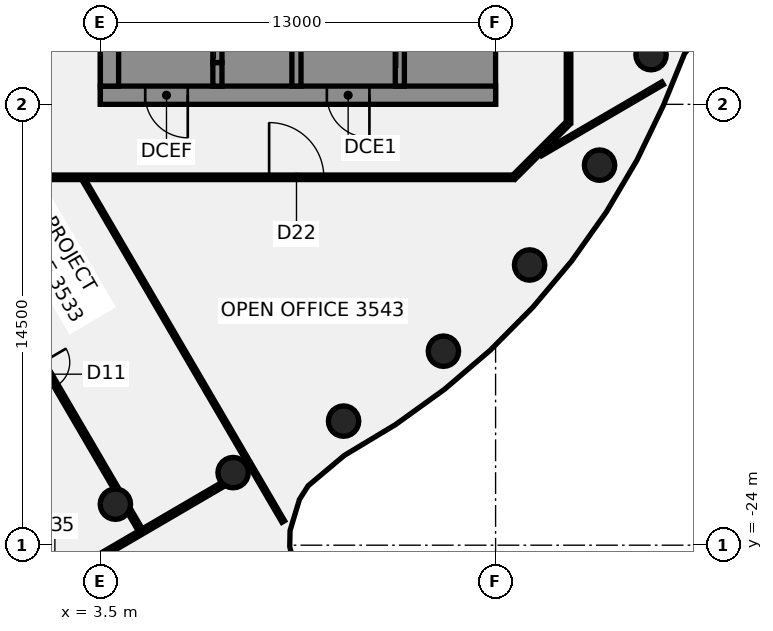
"""IFC4 building model, lengths in metres.
Left out: names, types, materials, properties, quantities, classifications, styles, units other than length and angle.
Written with IfcOpenShell. Run it as: python <this file> out.ifc"""

import sys

from ifc_helpers import new_model, si_unit, direction, frame, frame_2d, origin, origin_2d, place, context, subcontext, project, spatial, polyline, rectangle, circle, outline, extrude, element, fill, save


model = new_model("IFC4")
c1 = context("Model", 3, precision=1e-05, world=origin(), true_north=direction((0.0, 1.0)))
c2 = subcontext(c1, "Body", "Model", "MODEL_VIEW")
j1 = project(units=[si_unit("LENGTHUNIT", "METRE"), si_unit("PLANEANGLEUNIT", "RADIAN")], contexts=[c1])
p1 = place(None, origin())
s1 = spatial("IfcSite", under=j1, at=p1, CompositionType="ELEMENT")
p2 = place(p1, origin())
s2 = spatial("IfcBuilding", under=s1, at=p2, CompositionType="ELEMENT")
p3 = place(p2, frame((0.0, 0.0, 144.25)))
s3 = spatial("IfcBuildingStorey", under=s2, at=p3, CompositionType="ELEMENT", Elevation=144.25)
for number, where, z_axis, x_axis in (
    (1, (3.994, -22.651, -0.14), (0.0, 0.0, 1.0), (1.0, 0.0, 0.0)),
    (2, (7.866, -21.613, -0.14), (0.0, 0.0, 1.0), (1.0, 0.0, 0.0)),
    (3, (11.5, -19.919, -0.14), (0.0, 0.0, 1.0), (1.0, 0.0, 0.0)),
    (4, (14.784, -17.619, -0.14), (0.0, 0.0, 1.0), (1.0, 0.0, 0.0)),
    (5, (17.619, -14.784, -0.14), (0.0, 0.0, 1.0), (1.0, 0.0, 0.0)),
    (6, (19.919, -11.5, -0.14), (0.0, 0.0, 1.0), (1.0, 0.0, 0.0)),
    (7, (21.613, -7.866, -0.14), (0.0, 0.0, 1.0), (1.0, 0.0, 0.0)),
):
    element("IfcColumn", number, at=place(p3, frame(where, z_axis=z_axis, x_axis=x_axis)), inside=s3, PredefinedType="COLUMN", context=c2, shape_type="SweptSolid", body=[
        extrude(circle(Radius=0.5, at=origin_2d()), origin(), (0.0, 0.0, 1.0), 3.75),
    ])
p4 = place(p3, frame((-1.908, -11.995, 0.0), z_axis=(0.0, 0.0, 1.0), x_axis=(0.504524006629, -0.863397664309, 0.0)))
e8 = element("IfcWall", 8, at=p4, inside=s3, PredefinedType="PARTITIONING", context=c2, shape_type="SweptSolid", body=[
    extrude(rectangle(XDim=11.76, YDim=0.15, at=frame_2d((5.88, 0.0))), origin(), (0.0, 0.0, 1.0), 3.01),
])
p5 = place(p4, frame((6.94, 0.0, 0.0)))
e9 = element("IfcOpeningElement", 9, at=p5, cuts=e8, PredefinedType="OPENING", context=c2, shape_type="SweptSolid", body=[
    extrude(rectangle(XDim=0.9, YDim=2.1, at=frame_2d((0.45, 1.05))), frame((0.0, 0.085, 0.0), z_axis=(0.0, -1.0, 0.0), x_axis=(1.0, 0.0, 0.0)), (0.0, 0.0, 1.0), 0.17),
])
p6 = place(p3, frame((4.446, -22.869, 0.0), z_axis=(0.0, 0.0, 1.0), x_axis=(0.504392576963, -0.863474451448, 0.0)))
e10 = element("IfcWall", 10, at=p6, inside=s3, PredefinedType="PARTITIONING", context=c2, shape_type="SweptSolid", body=[
    extrude(rectangle(XDim=0.728, YDim=0.15, at=frame_2d((0.364, 0.0))), origin(), (0.0, 0.0, 1.0), 3.01),
])
p7 = place(p3, frame((2.949, -11.982, 0.0), z_axis=(0.0, 0.0, 1.0), x_axis=(0.504470329386, -0.863429028218, 0.0)))
e11 = element("IfcWall", 11, at=p7, inside=s3, PredefinedType="PARTITIONING", context=c2, shape_type="SweptSolid", body=[
    extrude(rectangle(XDim=13.016, YDim=0.1, at=frame_2d((6.508, 0.0))), origin(), (0.0, 0.0, 1.0), 3.01),
])
p8 = place(p3, frame((-17.1, -11.9, 0.0), z_axis=(0.0, 0.0, 1.0), x_axis=(1.0, 0.0, 0.0)))
e12 = element("IfcWall", 12, at=p8, inside=s3, PredefinedType="PARTITIONING", context=c2, shape_type="SweptSolid", body=[
    extrude(rectangle(XDim=34.165, YDim=0.15, at=frame_2d((17.083, 0.0))), origin(), (0.0, 0.0, 1.0), 3.01),
])
p9 = place(p8, frame((10.26, 0.0, 0.0)))
e13 = element("IfcOpeningElement", 13, at=p9, cuts=e12, PredefinedType="OPENING", context=c2, shape_type="SweptSolid", body=[
    extrude(rectangle(XDim=1.8, YDim=2.1, at=frame_2d((0.9, 1.05))), frame((0.0, 0.085, 0.0), z_axis=(0.0, -1.0, 0.0), x_axis=(1.0, 0.0, 0.0)), (0.0, 0.0, 1.0), 0.17),
])
p10 = place(p8, frame((1.8, 0.0, 0.0)))
e14 = element("IfcOpeningElement", 14, at=p10, cuts=e12, PredefinedType="OPENING", context=c2, shape_type="SweptSolid", body=[
    extrude(rectangle(XDim=1.8, YDim=2.1, at=frame_2d((0.9, 1.05))), frame((0.0, 0.085, 0.0), z_axis=(0.0, -1.0, 0.0), x_axis=(1.0, 0.0, 0.0)), (0.0, 0.0, 1.0), 0.17),
])
p11 = place(p8, frame((26.151, 0.0, 0.0)))
e15 = element("IfcOpeningElement", 15, at=p11, cuts=e12, PredefinedType="OPENING", context=c2, shape_type="SweptSolid", body=[
    extrude(rectangle(XDim=1.8, YDim=2.1, at=frame_2d((0.9, 1.05))), frame((0.0, 0.085, 0.0), z_axis=(0.0, -1.0, 0.0), x_axis=(1.0, 0.0, 0.0)), (0.0, 0.0, 1.0), 0.17),
])
p12 = place(p3, frame((-3.867, -28.66, 0.0), z_axis=(0.0, 0.0, 1.0), x_axis=(0.863397540326, 0.504524218803, 0.0)))
e16 = element("IfcWall", 16, at=p12, inside=s3, PredefinedType="PARTITIONING", context=c2, shape_type="SweptSolid", body=[
    extrude(rectangle(XDim=13.22, YDim=0.15, at=frame_2d((6.61, 0.0))), origin(), (0.0, 0.0, 1.0), 3.01),
])
p13 = place(p12, frame((6.099, 0.0, 0.0)))
e17 = element("IfcOpeningElement", 17, at=p13, cuts=e16, PredefinedType="OPENING", context=c2, shape_type="SweptSolid", body=[
    extrude(rectangle(XDim=1.4, YDim=2.1, at=frame_2d((0.7, 1.05))), frame((0.0, 0.085, 0.0), z_axis=(0.0, -1.0, 0.0), x_axis=(1.0, 0.0, 0.0)), (0.0, 0.0, 1.0), 0.17),
])
p14 = place(p3, frame((17.992, -11.144, 0.0), z_axis=(0.0, 0.0, 1.0), x_axis=(0.863423214725, 0.504480279371, 0.0)))
e18 = element("IfcWall", 18, at=p14, inside=s3, PredefinedType="PARTITIONING", context=c2, shape_type="SweptSolid", body=[
    extrude(rectangle(XDim=4.633, YDim=0.1, at=frame_2d((2.317, 0.0))), origin(), (0.0, 0.0, 1.0), 3.01),
])
p15 = place(p3, frame((17.1, -11.9, 0.0), z_axis=(0.0, 0.0, 1.0), x_axis=(0.707106781187, 0.707106781187, 0.0)))
e19 = element("IfcWall", 19, at=p15, inside=s3, PredefinedType="PARTITIONING", context=c2, shape_type="SweptSolid", body=[
    extrude(rectangle(XDim=2.505, YDim=0.15, at=frame_2d((1.253, 0.0))), origin(), (0.0, 0.0, 1.0), 3.01),
])
p16 = place(p3, frame((18.9, -10.1, 0.0), z_axis=(0.0, 0.0, 1.0), x_axis=(0.0, 1.0, 0.0)))
e20 = element("IfcWall", 20, at=p16, inside=s3, PredefinedType="PARTITIONING", context=c2, shape_type="SweptSolid", body=[
    extrude(rectangle(XDim=20.2, YDim=0.15, at=frame_2d((10.1, 0.0))), origin(), (0.0, 0.0, 1.0), 3.01),
])
p17 = place(p16, frame((8.251, 0.0, 0.0)))
e21 = element("IfcOpeningElement", 21, at=p17, cuts=e20, PredefinedType="OPENING", context=c2, shape_type="SweptSolid", body=[
    extrude(rectangle(XDim=1.8, YDim=2.1, at=frame_2d((0.9, 1.05))), frame((0.0, 0.085, 0.0), z_axis=(0.0, -1.0, 0.0), x_axis=(1.0, 0.0, 0.0)), (0.0, 0.0, 1.0), 0.17),
])
p18 = place(p16, frame((13.576, 0.0, 0.0)))
e22 = element("IfcOpeningElement", 22, at=p18, cuts=e20, PredefinedType="OPENING", context=c2, shape_type="SweptSolid", body=[
    extrude(rectangle(XDim=0.9, YDim=2.1, at=frame_2d((0.45, 1.05))), frame((0.0, 0.085, 0.0), z_axis=(0.0, -1.0, 0.0), x_axis=(1.0, 0.0, 0.0)), (0.0, 0.0, 1.0), 0.17),
])
p19 = place(p3, frame((16.5, -9.2, 0.0), z_axis=(0.0, 0.0, 1.0), x_axis=(-1.0, 0.0, 0.0)))
e23 = element("IfcWall", 23, at=p19, inside=s3, PredefinedType="SHEAR", context=c2, shape_type="SweptSolid", body=[
    extrude(rectangle(XDim=13.0, YDim=0.6, at=frame_2d((6.5, 0.0))), origin(), (0.0, 0.0, 1.0), 3.61),
])
p20 = place(p19, frame((4.15, 0.0, 0.0)))
e24 = element("IfcOpeningElement", 24, at=p20, cuts=e23, PredefinedType="OPENING", context=c2, shape_type="SweptSolid", body=[
    extrude(rectangle(XDim=1.4, YDim=2.1, at=frame_2d((0.7, 1.05))), frame((0.0, 0.31, 0.0), z_axis=(0.0, -1.0, 0.0), x_axis=(1.0, 0.0, 0.0)), (0.0, 0.0, 1.0), 0.62),
])
p21 = place(p19, frame((10.125, 0.0, 0.0)))
e25 = element("IfcOpeningElement", 25, at=p21, cuts=e23, PredefinedType="OPENING", context=c2, shape_type="SweptSolid", body=[
    extrude(rectangle(XDim=1.4, YDim=2.1, at=frame_2d((0.7, 1.05))), frame((0.0, 0.31, 0.0), z_axis=(0.0, -1.0, 0.0), x_axis=(1.0, 0.0, 0.0)), (0.0, 0.0, 1.0), 0.62),
])
p22 = place(p3, origin())
e26 = element("IfcWall", 26, at=p22, inside=s3, PredefinedType="SHEAR", context=c2, shape_type="SweptSolid", body=[
    extrude(outline(polyline([(13.5, -8.125), (13.5, -8.9), (15.9, -8.9), (16.5, -8.9), (16.5, 8.9), (15.9, 8.9), (13.5, 8.9), (13.5, 8.125), (15.9, 8.125), (15.9, 5.625), (13.5, 5.625), (13.5, 5.375), (15.9, 5.375), (15.9, -5.375), (13.5, -5.375), (13.5, -5.625), (15.9, -5.625), (15.9, -8.125), (13.5, -8.125)])), origin(), (0.0, 0.0, 1.0), 3.61),
])
p23 = place(p3, origin())
e27 = element("IfcWall", 27, at=p23, inside=s3, PredefinedType="SHEAR", context=c2, shape_type="SweptSolid", body=[
    extrude(outline(polyline([(7.5, -8.125), (7.5, -8.9), (9.8, -8.9), (9.8, -8.125), (9.8, -5.625), (9.55, -5.625), (9.55, -8.125), (7.5, -8.125)])), origin(), (0.0, 0.0, 1.0), 3.61),
])
p24 = place(p3, frame((7.35, -8.9, 0.0), z_axis=(0.0, 0.0, 1.0), x_axis=(0.0, 1.0, 0.0)))
e28 = element("IfcWall", 28, at=p24, inside=s3, PredefinedType="SHEAR", context=c2, shape_type="SweptSolid", body=[
    extrude(rectangle(XDim=0.775, YDim=0.3, at=frame_2d((0.387, 0.0))), origin(), (0.0, 0.0, 1.0), 3.61),
])
p25 = place(p3, frame((13.35, -8.9, 0.0), z_axis=(0.0, 0.0, 1.0), x_axis=(0.0, 1.0, 0.0)))
e29 = element("IfcWall", 29, at=p25, inside=s3, PredefinedType="SHEAR", context=c2, shape_type="SweptSolid", body=[
    extrude(rectangle(XDim=17.8, YDim=0.3, at=frame_2d((8.9, 0.0))), origin(), (0.0, 0.0, 1.0), 3.61),
])
p26 = place(p25, frame((1.325, 0.0, 0.0)))
e30 = element("IfcOpeningElement", 30, at=p26, cuts=e29, PredefinedType="OPENING", context=c2, shape_type="SweptSolid", body=[
    extrude(rectangle(XDim=1.4, YDim=2.1, at=frame_2d((0.7, 1.05))), frame((0.0, 0.16, 0.0), z_axis=(0.0, -1.0, 0.0), x_axis=(1.0, 0.0, 0.0)), (0.0, 0.0, 1.0), 0.32),
])
p27 = place(p25, frame((6.546, 0.0, 0.0)))
e31 = element("IfcOpeningElement", 31, at=p27, cuts=e29, PredefinedType="OPENING", context=c2, shape_type="SweptSolid", body=[
    extrude(rectangle(XDim=1.0, YDim=2.1, at=frame_2d((0.5, 1.05))), frame((0.0, 0.16, 0.0), z_axis=(0.0, -1.0, 0.0), x_axis=(1.0, 0.0, 0.0)), (0.0, 0.0, 1.0), 0.32),
])
p28 = place(p25, frame((12.046, 0.0, 0.0)))
e32 = element("IfcOpeningElement", 32, at=p28, cuts=e29, PredefinedType="OPENING", context=c2, shape_type="SweptSolid", body=[
    extrude(rectangle(XDim=1.0, YDim=2.1, at=frame_2d((0.5, 1.05))), frame((0.0, 0.16, 0.0), z_axis=(0.0, -1.0, 0.0), x_axis=(1.0, 0.0, 0.0)), (0.0, 0.0, 1.0), 0.32),
])
p29 = place(p3, frame((9.95, -8.9, 0.0), z_axis=(0.0, 0.0, 1.0), x_axis=(0.0, 1.0, 0.0)))
e33 = element("IfcWall", 33, at=p29, inside=s3, PredefinedType="SHEAR", context=c2, shape_type="SweptSolid", body=[
    extrude(rectangle(XDim=17.8, YDim=0.3, at=frame_2d((8.9, 0.0))), origin(), (0.0, 0.0, 1.0), 3.61),
])
p30 = place(p29, frame((4.175, 0.0, 0.0)))
e34 = element("IfcOpeningElement", 34, at=p30, cuts=e33, PredefinedType="OPENING", context=c2, shape_type="SweptSolid", body=[
    extrude(rectangle(XDim=1.2, YDim=2.1, at=frame_2d((0.6, 1.05))), frame((0.0, 0.16, 0.0), z_axis=(0.0, -1.0, 0.0), x_axis=(1.0, 0.0, 0.0)), (0.0, 0.0, 1.0), 0.32),
])
p31 = place(p29, frame((6.925, 0.0, 0.0)))
e35 = element("IfcOpeningElement", 35, at=p31, cuts=e33, PredefinedType="OPENING", context=c2, shape_type="SweptSolid", body=[
    extrude(rectangle(XDim=1.2, YDim=2.1, at=frame_2d((0.6, 1.05))), frame((0.0, 0.16, 0.0), z_axis=(0.0, -1.0, 0.0), x_axis=(1.0, 0.0, 0.0)), (0.0, 0.0, 1.0), 0.32),
])
p32 = place(p3, frame((7.35, -8.125, 0.0), z_axis=(0.0, 0.0, 1.0), x_axis=(0.0, 1.0, 0.0)))
e36 = element("IfcWall", 36, at=p32, inside=s3, PredefinedType="SHEAR", context=c2, shape_type="SweptSolid", body=[
    extrude(rectangle(XDim=2.5, YDim=0.3, at=frame_2d((1.25, 0.0))), origin(), (0.0, 0.0, 1.0), 3.61),
])
p33 = place(p32, frame((0.7, 0.0, 0.0)))
e37 = element("IfcOpeningElement", 37, at=p33, cuts=e36, PredefinedType="OPENING", context=c2, shape_type="SweptSolid", body=[
    extrude(rectangle(XDim=1.1, YDim=2.1, at=frame_2d((0.55, 1.05))), frame((0.0, 0.16, 0.0), z_axis=(0.0, -1.0, 0.0), x_axis=(1.0, 0.0, 0.0)), (0.0, 0.0, 1.0), 0.32),
])
p34 = place(p3, frame((3.8, -8.9, 0.0), z_axis=(0.0, 0.0, 1.0), x_axis=(0.0, 1.0, 0.0)))
e38 = element("IfcWall", 38, at=p34, inside=s3, PredefinedType="SHEAR", context=c2, shape_type="SweptSolid", body=[
    extrude(rectangle(XDim=17.8, YDim=0.6, at=frame_2d((8.9, 0.0))), origin(), (0.0, 0.0, 1.0), 3.61),
])
p35 = place(p34, frame((1.25, 0.0, 0.0)))
e39 = element("IfcOpeningElement", 39, at=p35, cuts=e38, PredefinedType="OPENING", context=c2, shape_type="SweptSolid", body=[
    extrude(rectangle(XDim=1.8, YDim=2.1, at=frame_2d((0.9, 1.05))), frame((0.0, 0.31, 0.0), z_axis=(0.0, -1.0, 0.0), x_axis=(1.0, 0.0, 0.0)), (0.0, 0.0, 1.0), 0.62),
])
p36 = place(p34, frame((11.698, 0.0, 0.0)))
e40 = element("IfcOpeningElement", 40, at=p36, cuts=e38, PredefinedType="OPENING", context=c2, shape_type="SweptSolid", body=[
    extrude(rectangle(XDim=1.0, YDim=2.1, at=frame_2d((0.5, 1.05))), frame((0.0, 0.31, 0.0), z_axis=(0.0, -1.0, 0.0), x_axis=(1.0, 0.0, 0.0)), (0.0, 0.0, 1.0), 0.62),
])
p37 = place(p34, frame((15.222, 0.0, 0.0)))
e41 = element("IfcOpeningElement", 41, at=p37, cuts=e38, PredefinedType="OPENING", context=c2, shape_type="SweptSolid", body=[
    extrude(rectangle(XDim=1.0, YDim=2.1, at=frame_2d((0.5, 1.05))), frame((0.0, 0.31, 0.0), z_axis=(0.0, -1.0, 0.0), x_axis=(1.0, 0.0, 0.0)), (0.0, 0.0, 1.0), 0.62),
])
p38 = place(p5, origin())
e42 = element("IfcDoor", 42, at=p38, inside=s3, OperationType="SINGLE_SWING_LEFT", PredefinedType="DOOR", context=c2, shape_type="SweptSolid", body=[
    extrude(rectangle(XDim=0.9, YDim=2.1, at=frame_2d((0.45, 1.05))), frame((0.0, 0.025, 0.0), z_axis=(0.0, -1.0, 0.0), x_axis=(1.0, 0.0, 0.0)), (0.0, 0.0, 1.0), 0.05),
])
fill(e9, e42)
p39 = place(p11, frame((1.8, 0.0, 0.0), z_axis=(0.0, 0.0, 1.0), x_axis=(-1.0, 0.0, 0.0)))
e43 = element("IfcDoor", 43, at=p39, inside=s3, OperationType="DOUBLE_DOOR_SINGLE_SWING", PredefinedType="DOOR", context=c2, shape_type="SweptSolid", body=[
    extrude(rectangle(XDim=1.8, YDim=2.1, at=frame_2d((0.9, 1.05))), frame((0.0, 0.025, 0.0), z_axis=(0.0, -1.0, 0.0), x_axis=(1.0, 0.0, 0.0)), (0.0, 0.0, 1.0), 0.05),
])
fill(e15, e43)
p40 = place(p20, origin())
e44 = element("IfcDoor", 44, at=p40, inside=s3, OperationType="SINGLE_SWING_LEFT", PredefinedType="DOOR", context=c2, shape_type="SweptSolid", body=[
    extrude(rectangle(XDim=1.4, YDim=2.1, at=frame_2d((0.7, 1.05))), frame((0.0, 0.025, 0.0), z_axis=(0.0, -1.0, 0.0), x_axis=(1.0, 0.0, 0.0)), (0.0, 0.0, 1.0), 0.05),
])
fill(e24, e44)
p41 = place(p21, origin())
e45 = element("IfcDoor", 45, at=p41, inside=s3, OperationType="SINGLE_SWING_LEFT", PredefinedType="DOOR", context=c2, shape_type="SweptSolid", body=[
    extrude(rectangle(XDim=1.4, YDim=2.1, at=frame_2d((0.7, 1.05))), frame((0.0, 0.025, 0.0), z_axis=(0.0, -1.0, 0.0), x_axis=(1.0, 0.0, 0.0)), (0.0, 0.0, 1.0), 0.05),
])
fill(e25, e45)
save(model, sys.argv[1])
